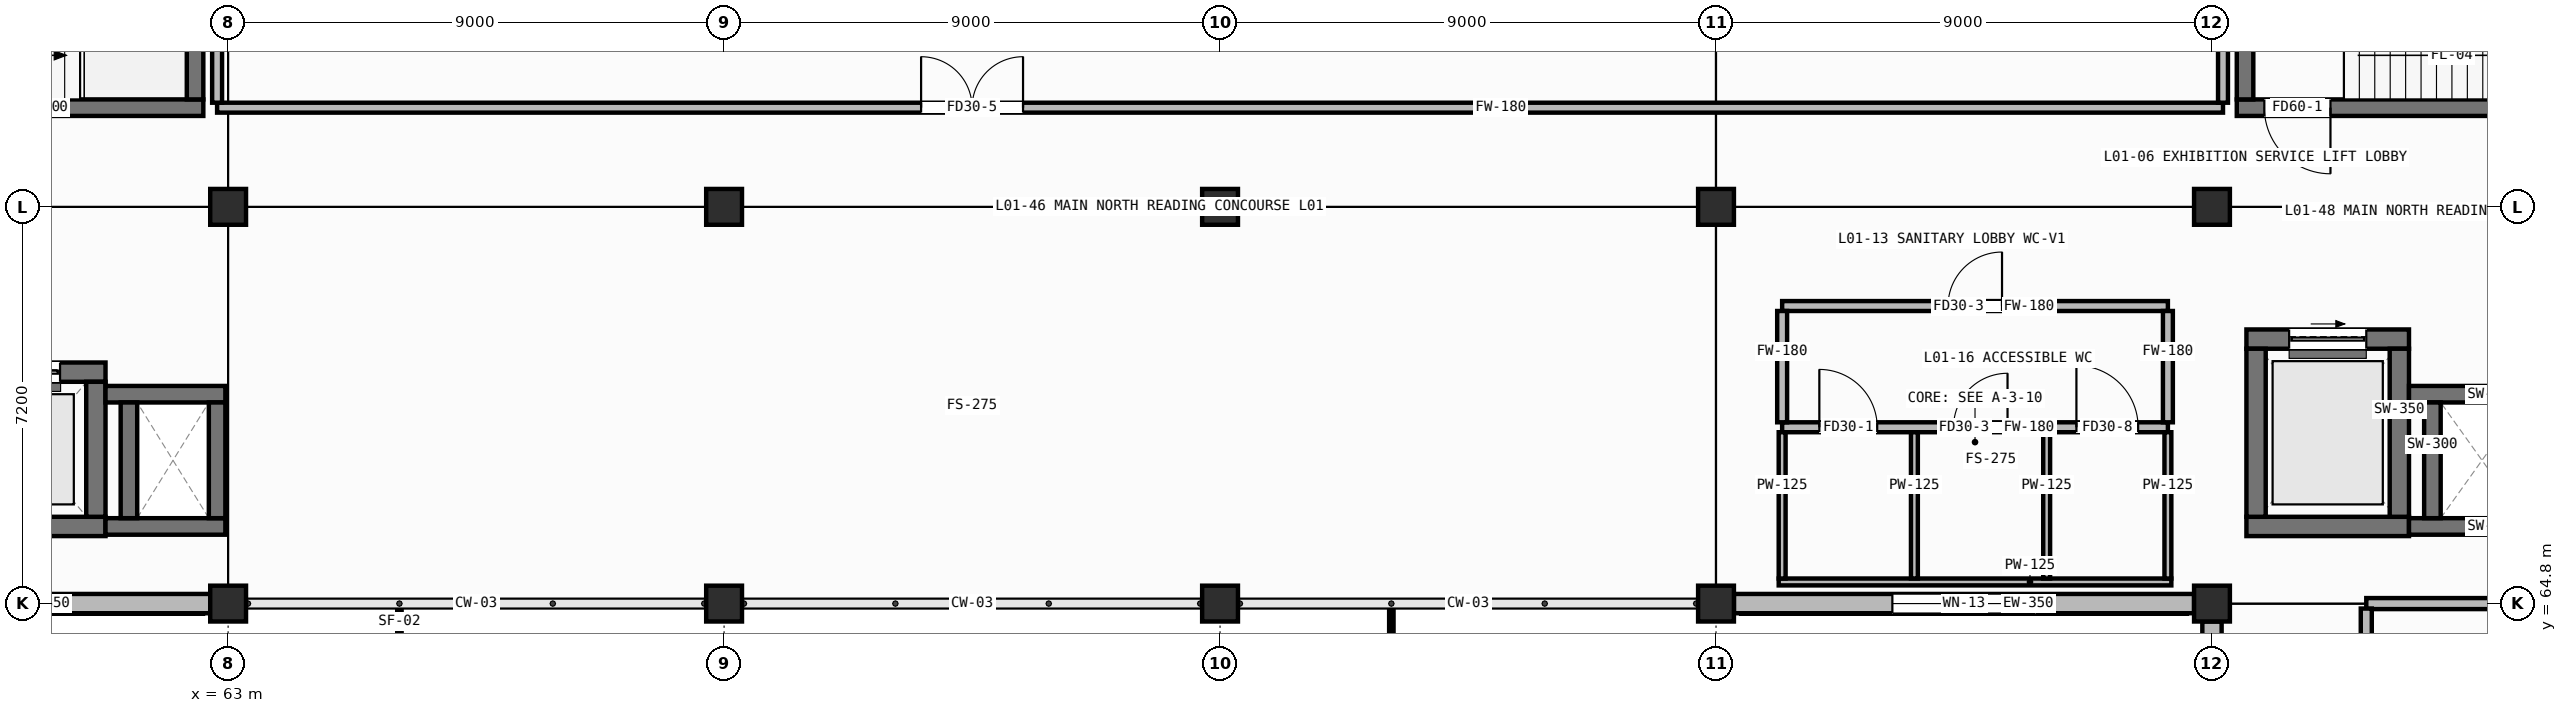
"""IFC4 building model, lengths in metres.
Left out: names, types, materials, properties, quantities, classifications, styles, units other than length and angle.
Written with IfcOpenShell. Run it as: python <this file> out.ifc"""

import sys

from ifc_helpers import new_model, si_unit, direction, frame, frame_2d, origin, origin_2d, place, context, subcontext, project, spatial, rectangle, hollow_rectangle, extrude, element, fill, save


model = new_model("IFC4")
c1 = context("Model", 3, precision=1e-05, world=origin(), true_north=direction((0.0, 1.0)))
c2 = subcontext(c1, "Body", "Model", "MODEL_VIEW")
j1 = project(units=[si_unit("LENGTHUNIT", "METRE"), si_unit("PLANEANGLEUNIT", "RADIAN")], contexts=[c1])
p1 = place(None, origin())
s1 = spatial("IfcSite", under=j1, at=p1, CompositionType="ELEMENT")
p2 = place(p1, origin())
s2 = spatial("IfcBuilding", under=s1, at=p2, CompositionType="ELEMENT")
p3 = place(p2, origin())
s3 = spatial("IfcBuildingStorey", under=s2, at=p3, CompositionType="ELEMENT", Elevation=0.0)
for number, where, z_axis, x_axis in (
    (1, (63.0, 64.8, 0.0), (0.0, 0.0, 1.0), (1.0, 0.0, 0.0)),
    (2, (63.0, 72.0, 0.0), (0.0, 0.0, 1.0), (1.0, 0.0, 0.0)),
    (3, (72.0, 64.8, 0.0), (0.0, 0.0, 1.0), (1.0, 0.0, 0.0)),
    (4, (72.0, 72.0, 0.0), (0.0, 0.0, 1.0), (1.0, 0.0, 0.0)),
    (5, (81.0, 64.8, 0.0), (0.0, 0.0, 1.0), (1.0, 0.0, 0.0)),
    (6, (81.0, 72.0, 0.0), (0.0, 0.0, 1.0), (1.0, 0.0, 0.0)),
    (7, (90.0, 64.8, 0.0), (0.0, 0.0, 1.0), (1.0, 0.0, 0.0)),
    (8, (90.0, 72.0, 0.0), (0.0, 0.0, 1.0), (1.0, 0.0, 0.0)),
    (9, (99.0, 64.8, 0.0), (0.0, 0.0, 1.0), (1.0, 0.0, 0.0)),
    (10, (99.0, 72.0, 0.0), (0.0, 0.0, 1.0), (1.0, 0.0, 0.0)),
):
    element("IfcColumn", number, at=place(p3, frame(where, z_axis=z_axis, x_axis=x_axis)), inside=s3, PredefinedType="COLUMN", context=c2, shape_type="SweptSolid", body=[
        extrude(hollow_rectangle(XDim=0.65, YDim=0.65, WallThickness=0.025, at=origin_2d()), origin(), (0.0, 0.0, 1.0), 4.8),
    ])
p4 = place(p3, frame((54.325, 64.8, 0.0), z_axis=(0.0, 0.0, 1.0), x_axis=(1.0, 0.0, 0.0)))
e11 = element("IfcWall", 11, at=p4, inside=s3, PredefinedType="STANDARD", context=c2, shape_type="SweptSolid", body=[
    extrude(rectangle(XDim=8.35, YDim=0.35, at=frame_2d((4.175, 0.0))), origin(), (0.0, 0.0, 1.0), 4.055),
])
p5 = place(p4, frame((2.875, 0.0, 0.85)))
e12 = element("IfcOpeningElement", 12, at=p5, cuts=e11, PredefinedType="OPENING", context=c2, shape_type="SweptSolid", body=[
    extrude(rectangle(XDim=2.6, YDim=1.6, at=frame_2d((1.3, 0.8))), frame((0.0, 0.187, 0.0), z_axis=(0.0, -1.0, 0.0), x_axis=(1.0, 0.0, 0.0)), (0.0, 0.0, 1.0), 0.374),
])
p6 = place(p3, frame((90.325, 64.8, 0.0), z_axis=(0.0, 0.0, 1.0), x_axis=(1.0, 0.0, 0.0)))
e13 = element("IfcWall", 13, at=p6, inside=s3, PredefinedType="STANDARD", context=c2, shape_type="SweptSolid", body=[
    extrude(rectangle(XDim=8.35, YDim=0.35, at=frame_2d((4.175, 0.0))), origin(), (0.0, 0.0, 1.0), 4.055),
])
p7 = place(p6, frame((2.875, 0.0, 0.85)))
e14 = element("IfcOpeningElement", 14, at=p7, cuts=e13, PredefinedType="OPENING", context=c2, shape_type="SweptSolid", body=[
    extrude(rectangle(XDim=2.6, YDim=1.6, at=frame_2d((1.3, 0.8))), frame((0.0, 0.187, 0.0), z_axis=(0.0, -1.0, 0.0), x_axis=(1.0, 0.0, 0.0)), (0.0, 0.0, 1.0), 0.374),
])
p8 = place(p3, frame((99.0, 57.925, 0.0), z_axis=(0.0, 0.0, 1.0), x_axis=(0.0, 1.0, 0.0)))
e15 = element("IfcWall", 15, at=p8, inside=s3, PredefinedType="STANDARD", context=c2, shape_type="SweptSolid", body=[
    extrude(rectangle(XDim=6.55, YDim=0.35, at=frame_2d((3.275, 0.0))), origin(), (0.0, 0.0, 1.0), 4.055),
])
p9 = place(p8, frame((1.975, 0.0, 0.85)))
e16 = element("IfcOpeningElement", 16, at=p9, cuts=e15, PredefinedType="OPENING", context=c2, shape_type="SweptSolid", body=[
    extrude(rectangle(XDim=2.6, YDim=1.6, at=frame_2d((1.3, 0.8))), frame((0.0, 0.187, 0.0), z_axis=(0.0, -1.0, 0.0), x_axis=(1.0, 0.0, 0.0)), (0.0, 0.0, 1.0), 0.374),
])
p10 = place(p3, frame((54.45, 73.8, 0.0), z_axis=(0.0, 0.0, 1.0), x_axis=(1.0, 0.0, 0.0)))
e17 = element("IfcWall", 17, at=p10, inside=s3, PredefinedType="SHEAR", context=c2, shape_type="SweptSolid", body=[
    extrude(rectangle(XDim=8.1, YDim=0.3, at=frame_2d((4.05, 0.0))), origin(), (0.0, 0.0, 1.0), 4.555),
])
p11 = place(p10, frame((0.5, 0.0, 0.0)))
e18 = element("IfcOpeningElement", 18, at=p11, cuts=e17, PredefinedType="OPENING", context=c2, shape_type="SweptSolid", body=[
    extrude(rectangle(XDim=1.2, YDim=2.1, at=frame_2d((0.6, 1.05))), frame((0.0, 0.162, 0.0), z_axis=(0.0, -1.0, 0.0), x_axis=(1.0, 0.0, 0.0)), (0.0, 0.0, 1.0), 0.324),
])
p12 = place(p3, frame((62.4, 73.95, 0.0), z_axis=(0.0, 0.0, 1.0), x_axis=(0.0, 1.0, 0.0)))
e19 = element("IfcWall", 19, at=p12, inside=s3, PredefinedType="SHEAR", context=c2, shape_type="SweptSolid", body=[
    extrude(rectangle(XDim=3.8, YDim=0.3, at=frame_2d((1.9, 0.0))), origin(), (0.0, 0.0, 1.0), 4.555),
])
p13 = place(p3, frame((99.45, 73.8, 0.0), z_axis=(0.0, 0.0, 1.0), x_axis=(1.0, 0.0, 0.0)))
e20 = element("IfcWall", 20, at=p13, inside=s3, PredefinedType="SHEAR", context=c2, shape_type="SweptSolid", body=[
    extrude(rectangle(XDim=8.1, YDim=0.3, at=frame_2d((4.05, 0.0))), origin(), (0.0, 0.0, 1.0), 4.555),
])
p14 = place(p13, frame((0.5, 0.0, 0.0)))
e21 = element("IfcOpeningElement", 21, at=p14, cuts=e20, PredefinedType="OPENING", context=c2, shape_type="SweptSolid", body=[
    extrude(rectangle(XDim=1.2, YDim=2.1, at=frame_2d((0.6, 1.05))), frame((0.0, 0.162, 0.0), z_axis=(0.0, -1.0, 0.0), x_axis=(1.0, 0.0, 0.0)), (0.0, 0.0, 1.0), 0.324),
])
p15 = place(p3, frame((99.6, 73.95, 0.0), z_axis=(0.0, 0.0, 1.0), x_axis=(0.0, 1.0, 0.0)))
e22 = element("IfcWall", 22, at=p15, inside=s3, PredefinedType="SHEAR", context=c2, shape_type="SweptSolid", body=[
    extrude(rectangle(XDim=3.8, YDim=0.3, at=frame_2d((1.9, 0.0))), origin(), (0.0, 0.0, 1.0), 4.555),
])
p16 = place(p3, frame((58.025, 66.2, 0.0), z_axis=(0.0, 0.0, 1.0), x_axis=(1.0, 0.0, 0.0)))
e23 = element("IfcWall", 23, at=p16, inside=s3, PredefinedType="SHEAR", context=c2, shape_type="SweptSolid", body=[
    extrude(rectangle(XDim=2.75, YDim=0.35, at=frame_2d((1.375, 0.0))), origin(), (0.0, 0.0, 1.0), 4.555),
])
p17 = place(p3, frame((58.025, 69.0, 0.0), z_axis=(0.0, 0.0, 1.0), x_axis=(1.0, 0.0, 0.0)))
e24 = element("IfcWall", 24, at=p17, inside=s3, PredefinedType="SHEAR", context=c2, shape_type="SweptSolid", body=[
    extrude(rectangle(XDim=2.75, YDim=0.35, at=frame_2d((1.375, 0.0))), origin(), (0.0, 0.0, 1.0), 4.555),
])
p18 = place(p17, frame((0.825, 0.0, 0.0)))
e25 = element("IfcOpeningElement", 25, at=p18, cuts=e24, PredefinedType="OPENING", context=c2, shape_type="SweptSolid", body=[
    extrude(rectangle(XDim=1.1, YDim=2.1, at=frame_2d((0.55, 1.05))), frame((0.0, 0.187, 0.0), z_axis=(0.0, -1.0, 0.0), x_axis=(1.0, 0.0, 0.0)), (0.0, 0.0, 1.0), 0.374),
])
p19 = place(p3, frame((60.6, 66.375, 0.0), z_axis=(0.0, 0.0, 1.0), x_axis=(0.0, 1.0, 0.0)))
e26 = element("IfcWall", 26, at=p19, inside=s3, PredefinedType="SHEAR", context=c2, shape_type="SweptSolid", body=[
    extrude(rectangle(XDim=2.45, YDim=0.35, at=frame_2d((1.225, 0.0))), origin(), (0.0, 0.0, 1.0), 4.555),
])
p20 = place(p3, frame((99.625, 66.2, 0.0), z_axis=(0.0, 0.0, 1.0), x_axis=(1.0, 0.0, 0.0)))
e27 = element("IfcWall", 27, at=p20, inside=s3, PredefinedType="SHEAR", context=c2, shape_type="SweptSolid", body=[
    extrude(rectangle(XDim=2.95, YDim=0.35, at=frame_2d((1.475, 0.0))), origin(), (0.0, 0.0, 1.0), 4.555),
])
p21 = place(p3, frame((99.625, 69.6, 0.0), z_axis=(0.0, 0.0, 1.0), x_axis=(1.0, 0.0, 0.0)))
e28 = element("IfcWall", 28, at=p21, inside=s3, PredefinedType="SHEAR", context=c2, shape_type="SweptSolid", body=[
    extrude(rectangle(XDim=2.95, YDim=0.35, at=frame_2d((1.475, 0.0))), origin(), (0.0, 0.0, 1.0), 4.555),
])
p22 = place(p21, frame((0.775, 0.0, 0.0)))
e29 = element("IfcOpeningElement", 29, at=p22, cuts=e28, PredefinedType="OPENING", context=c2, shape_type="SweptSolid", body=[
    extrude(rectangle(XDim=1.4, YDim=2.15, at=frame_2d((0.7, 1.075))), frame((0.0, 0.187, 0.0), z_axis=(0.0, -1.0, 0.0), x_axis=(1.0, 0.0, 0.0)), (0.0, 0.0, 1.0), 0.374),
])
for number, where, z_axis, x_axis in (
    (30, (99.8, 66.375, 0.0), (0.0, 0.0, 1.0), (0.0, 1.0, 0.0)),
    (31, (102.4, 66.375, 0.0), (0.0, 0.0, 1.0), (0.0, 1.0, 0.0)),
):
    element("IfcWall", number, at=place(p3, frame(where, z_axis=z_axis, x_axis=x_axis)), inside=s3, PredefinedType="SHEAR", context=c2, shape_type="SweptSolid", body=[
        extrude(rectangle(XDim=3.05, YDim=0.35, at=frame_2d((1.525, 0.0))), origin(), (0.0, 0.0, 1.0), 4.555),
    ])
for number, where, z_axis, x_axis in (
    (32, (60.775, 66.2, 0.0), (0.0, 0.0, 1.0), (1.0, 0.0, 0.0)),
    (33, (60.775, 68.6, 0.0), (0.0, 0.0, 1.0), (1.0, 0.0, 0.0)),
):
    element("IfcWall", number, at=place(p3, frame(where, z_axis=z_axis, x_axis=x_axis)), inside=s3, PredefinedType="SHEAR", context=c2, shape_type="SweptSolid", body=[
        extrude(rectangle(XDim=2.175, YDim=0.3, at=frame_2d((1.087, 0.0))), origin(), (0.0, 0.0, 1.0), 4.555),
    ])
for number, where, z_axis, x_axis in (
    (34, (61.2, 66.35, 0.0), (0.0, 0.0, 1.0), (0.0, 1.0, 0.0)),
    (35, (62.8, 66.35, 0.0), (0.0, 0.0, 1.0), (0.0, 1.0, 0.0)),
):
    element("IfcWall", number, at=place(p3, frame(where, z_axis=z_axis, x_axis=x_axis)), inside=s3, PredefinedType="SHEAR", context=c2, shape_type="SweptSolid", body=[
        extrude(rectangle(XDim=2.1, YDim=0.3, at=frame_2d((1.05, 0.0))), origin(), (0.0, 0.0, 1.0), 4.555),
    ])
for number, where, z_axis, x_axis in (
    (36, (102.575, 66.2, 0.0), (0.0, 0.0, 1.0), (1.0, 0.0, 0.0)),
    (37, (102.575, 68.6, 0.0), (0.0, 0.0, 1.0), (1.0, 0.0, 0.0)),
):
    element("IfcWall", number, at=place(p3, frame(where, z_axis=z_axis, x_axis=x_axis)), inside=s3, PredefinedType="SHEAR", context=c2, shape_type="SweptSolid", body=[
        extrude(rectangle(XDim=2.375, YDim=0.3, at=frame_2d((1.188, 0.0))), origin(), (0.0, 0.0, 1.0), 4.555),
    ])
p23 = place(p3, frame((103.0, 66.35, 0.0), z_axis=(0.0, 0.0, 1.0), x_axis=(0.0, 1.0, 0.0)))
e38 = element("IfcWall", 38, at=p23, inside=s3, PredefinedType="SHEAR", context=c2, shape_type="SweptSolid", body=[
    extrude(rectangle(XDim=2.1, YDim=0.3, at=frame_2d((1.05, 0.0))), origin(), (0.0, 0.0, 1.0), 4.555),
])
p24 = place(p3, frame((91.137, 65.192, 0.0), z_axis=(0.0, 0.0, 1.0), x_axis=(1.0, 0.0, 0.0)))
e39 = element("IfcWall", 39, at=p24, inside=s3, PredefinedType="PARTITIONING", context=c2, shape_type="SweptSolid", body=[
    extrude(rectangle(XDim=7.125, YDim=0.125, at=frame_2d((3.562, 0.0))), origin(), (0.0, 0.0, 1.0), 4.555),
])
p25 = place(p3, frame((91.2, 68.0, 0.0), z_axis=(0.0, 0.0, 1.0), x_axis=(1.0, 0.0, 0.0)))
e40 = element("IfcWall", 40, at=p25, inside=s3, PredefinedType="PARTITIONING", context=c2, shape_type="SweptSolid", body=[
    extrude(rectangle(XDim=7.0, YDim=0.18, at=frame_2d((3.5, 0.0))), origin(), (0.0, 0.0, 1.0), 4.555),
])
p26 = place(p25, frame((0.675, 0.0, 0.0)))
e41 = element("IfcOpeningElement", 41, at=p26, cuts=e40, PredefinedType="OPENING", context=c2, shape_type="SweptSolid", body=[
    extrude(rectangle(XDim=1.05, YDim=2.1, at=frame_2d((0.525, 1.05))), frame((0.0, 0.102, 0.0), z_axis=(0.0, -1.0, 0.0), x_axis=(1.0, 0.0, 0.0)), (0.0, 0.0, 1.0), 0.204),
])
p27 = place(p25, frame((3.11, 0.0, 0.0)))
e42 = element("IfcOpeningElement", 42, at=p27, cuts=e40, PredefinedType="OPENING", context=c2, shape_type="SweptSolid", body=[
    extrude(rectangle(XDim=0.98, YDim=2.02, at=frame_2d((0.49, 1.01))), frame((0.0, 0.102, 0.0), z_axis=(0.0, -1.0, 0.0), x_axis=(1.0, 0.0, 0.0)), (0.0, 0.0, 1.0), 0.204),
])
p28 = place(p25, frame((5.34, 0.0, 0.0)))
e43 = element("IfcOpeningElement", 43, at=p28, cuts=e40, PredefinedType="OPENING", context=c2, shape_type="SweptSolid", body=[
    extrude(rectangle(XDim=1.12, YDim=2.08, at=frame_2d((0.56, 1.04))), frame((0.0, 0.102, 0.0), z_axis=(0.0, -1.0, 0.0), x_axis=(1.0, 0.0, 0.0)), (0.0, 0.0, 1.0), 0.204),
])
p29 = place(p3, frame((91.2, 70.2, 0.0), z_axis=(0.0, 0.0, 1.0), x_axis=(1.0, 0.0, 0.0)))
e44 = element("IfcWall", 44, at=p29, inside=s3, PredefinedType="PARTITIONING", context=c2, shape_type="SweptSolid", body=[
    extrude(rectangle(XDim=7.0, YDim=0.18, at=frame_2d((3.5, 0.0))), origin(), (0.0, 0.0, 1.0), 4.555),
])
p30 = place(p29, frame((3.01, 0.0, 0.0)))
e45 = element("IfcOpeningElement", 45, at=p30, cuts=e44, PredefinedType="OPENING", context=c2, shape_type="SweptSolid", body=[
    extrude(rectangle(XDim=0.98, YDim=2.02, at=frame_2d((0.49, 1.01))), frame((0.0, 0.102, 0.0), z_axis=(0.0, -1.0, 0.0), x_axis=(1.0, 0.0, 0.0)), (0.0, 0.0, 1.0), 0.204),
])
for number, where, z_axis, x_axis in (
    (46, (91.2, 68.09, 0.0), (0.0, 0.0, 1.0), (0.0, 1.0, 0.0)),
    (47, (98.2, 68.09, 0.0), (0.0, 0.0, 1.0), (0.0, 1.0, 0.0)),
):
    element("IfcWall", number, at=place(p3, frame(where, z_axis=z_axis, x_axis=x_axis)), inside=s3, PredefinedType="PARTITIONING", context=c2, shape_type="SweptSolid", body=[
        extrude(rectangle(XDim=2.02, YDim=0.18, at=frame_2d((1.01, 0.0))), origin(), (0.0, 0.0, 1.0), 4.555),
    ])
for number, where, z_axis, x_axis in (
    (48, (91.2, 65.255, 0.0), (0.0, 0.0, 1.0), (0.0, 1.0, 0.0)),
    (49, (93.6, 65.255, 0.0), (0.0, 0.0, 1.0), (0.0, 1.0, 0.0)),
    (50, (96.0, 65.255, 0.0), (0.0, 0.0, 1.0), (0.0, 1.0, 0.0)),
    (51, (98.2, 65.255, 0.0), (0.0, 0.0, 1.0), (0.0, 1.0, 0.0)),
):
    element("IfcWall", number, at=place(p3, frame(where, z_axis=z_axis, x_axis=x_axis)), inside=s3, PredefinedType="PARTITIONING", context=c2, shape_type="SweptSolid", body=[
        extrude(rectangle(XDim=2.655, YDim=0.125, at=frame_2d((1.328, 0.0))), origin(), (0.0, 0.0, 1.0), 4.555),
    ])
p31 = place(p3, frame((101.8, 64.8, 0.0), z_axis=(0.0, 0.0, 1.0), x_axis=(1.0, 0.0, 0.0)))
e52 = element("IfcWall", 52, at=p31, inside=s3, PredefinedType="PARTITIONING", context=c2, shape_type="SweptSolid", body=[
    extrude(rectangle(XDim=5.78, YDim=0.2, at=frame_2d((2.89, 0.0))), origin(), (0.0, 0.0, 1.0), 3.835),
])
p32 = place(p3, frame((101.8, 36.09, 0.0), z_axis=(0.0, 0.0, 1.0), x_axis=(0.0, 1.0, 0.0)))
e53 = element("IfcWall", 53, at=p32, inside=s3, PredefinedType="PARTITIONING", context=c2, shape_type="SweptSolid", body=[
    extrude(rectangle(XDim=28.62, YDim=0.2, at=frame_2d((14.31, 0.0))), origin(), (0.0, 0.0, 1.0), 4.555),
])
p33 = place(p32, frame((15.11, 0.0, 0.0)))
e54 = element("IfcOpeningElement", 54, at=p33, cuts=e53, PredefinedType="OPENING", context=c2, shape_type="SweptSolid", body=[
    extrude(rectangle(XDim=1.6, YDim=2.12, at=frame_2d((0.8, 1.06))), frame((0.0, 0.112, 0.0), z_axis=(0.0, -1.0, 0.0), x_axis=(1.0, 0.0, 0.0)), (0.0, 0.0, 1.0), 0.224),
])
p34 = place(p3, frame((62.8, 73.8, 0.0), z_axis=(0.0, 0.0, 1.0), x_axis=(1.0, 0.0, 0.0)))
e55 = element("IfcWall", 55, at=p34, inside=s3, PredefinedType="PARTITIONING", context=c2, shape_type="SweptSolid", body=[
    extrude(rectangle(XDim=36.4, YDim=0.18, at=frame_2d((18.2, 0.0))), origin(), (0.0, 0.0, 1.0), 4.555),
])
p35 = place(p34, frame((12.775, 0.0, 0.0)))
e56 = element("IfcOpeningElement", 56, at=p35, cuts=e55, PredefinedType="OPENING", context=c2, shape_type="SweptSolid", body=[
    extrude(rectangle(XDim=1.85, YDim=2.12, at=frame_2d((0.925, 1.06))), frame((0.0, 0.102, 0.0), z_axis=(0.0, -1.0, 0.0), x_axis=(1.0, 0.0, 0.0)), (0.0, 0.0, 1.0), 0.204),
])
for number, where, z_axis, x_axis in (
    (57, (62.8, 73.89, 0.0), (0.0, 0.0, 1.0), (0.0, 1.0, 0.0)),
    (58, (99.2, 73.89, 0.0), (0.0, 0.0, 1.0), (0.0, 1.0, 0.0)),
):
    element("IfcWall", number, at=place(p3, frame(where, z_axis=z_axis, x_axis=x_axis)), inside=s3, PredefinedType="PARTITIONING", context=c2, shape_type="SweptSolid", body=[
        extrude(rectangle(XDim=11.42, YDim=0.18, at=frame_2d((5.71, 0.0))), origin(), (0.0, 0.0, 1.0), 3.835),
    ])
p36 = place(p7, origin())
e59 = element("IfcWindow", 59, at=p36, inside=s3, PartitioningType="DOUBLE_PANEL_VERTICAL", PredefinedType="WINDOW", context=c2, shape_type="SweptSolid", body=[
    extrude(rectangle(XDim=2.6, YDim=1.6, at=frame_2d((1.3, 0.8))), frame((0.0, 0.03, 0.0), z_axis=(0.0, -1.0, 0.0), x_axis=(1.0, 0.0, 0.0)), (0.0, 0.0, 1.0), 0.06),
])
fill(e14, e59)
p37 = place(p14, frame((1.2, 0.0, 0.0), z_axis=(0.0, 0.0, 1.0), x_axis=(-1.0, 0.0, 0.0)))
e60 = element("IfcDoor", 60, at=p37, inside=s3, OperationType="SINGLE_SWING_LEFT", PredefinedType="DOOR", context=c2, shape_type="SweptSolid", body=[
    extrude(rectangle(XDim=1.2, YDim=2.1, at=frame_2d((0.6, 1.05))), frame((0.0, 0.025, 0.0), z_axis=(0.0, -1.0, 0.0), x_axis=(1.0, 0.0, 0.0)), (0.0, 0.0, 1.0), 0.05),
])
fill(e21, e60)
p38 = place(p18, origin())
e61 = element("IfcDoor", 61, at=p38, inside=s3, OperationType="SLIDING_TO_RIGHT", PredefinedType="DOOR", context=c2, shape_type="SweptSolid", body=[
    extrude(rectangle(XDim=1.1, YDim=2.1, at=frame_2d((0.55, 1.05))), frame((0.0, 0.025, 0.0), z_axis=(0.0, -1.0, 0.0), x_axis=(1.0, 0.0, 0.0)), (0.0, 0.0, 1.0), 0.05),
])
fill(e25, e61)
p39 = place(p22, origin())
e62 = element("IfcDoor", 62, at=p39, inside=s3, OperationType="SLIDING_TO_RIGHT", PredefinedType="DOOR", context=c2, shape_type="SweptSolid", body=[
    extrude(rectangle(XDim=1.4, YDim=2.15, at=frame_2d((0.7, 1.075))), frame((0.0, 0.025, 0.0), z_axis=(0.0, -1.0, 0.0), x_axis=(1.0, 0.0, 0.0)), (0.0, 0.0, 1.0), 0.05),
])
fill(e29, e62)
p40 = place(p30, origin())
e63 = element("IfcDoor", 63, at=p40, inside=s3, OperationType="SINGLE_SWING_RIGHT", PredefinedType="DOOR", context=c2, shape_type="SweptSolid", body=[
    extrude(rectangle(XDim=0.98, YDim=2.02, at=frame_2d((0.49, 1.01))), frame((0.0, 0.025, 0.0), z_axis=(0.0, -1.0, 0.0), x_axis=(1.0, 0.0, 0.0)), (0.0, 0.0, 1.0), 0.05),
])
fill(e45, e63)
p41 = place(p26, origin())
e64 = element("IfcDoor", 64, at=p41, inside=s3, OperationType="SINGLE_SWING_LEFT", PredefinedType="DOOR", context=c2, shape_type="SweptSolid", body=[
    extrude(rectangle(XDim=1.05, YDim=2.1, at=frame_2d((0.525, 1.05))), frame((0.0, 0.025, 0.0), z_axis=(0.0, -1.0, 0.0), x_axis=(1.0, 0.0, 0.0)), (0.0, 0.0, 1.0), 0.05),
])
fill(e41, e64)
p42 = place(p27, origin())
e65 = element("IfcDoor", 65, at=p42, inside=s3, OperationType="SINGLE_SWING_RIGHT", PredefinedType="DOOR", context=c2, shape_type="SweptSolid", body=[
    extrude(rectangle(XDim=0.98, YDim=2.02, at=frame_2d((0.49, 1.01))), frame((0.0, 0.025, 0.0), z_axis=(0.0, -1.0, 0.0), x_axis=(1.0, 0.0, 0.0)), (0.0, 0.0, 1.0), 0.05),
])
fill(e42, e65)
p43 = place(p28, origin())
e66 = element("IfcDoor", 66, at=p43, inside=s3, OperationType="SINGLE_SWING_LEFT", PredefinedType="DOOR", context=c2, shape_type="SweptSolid", body=[
    extrude(rectangle(XDim=1.12, YDim=2.08, at=frame_2d((0.56, 1.04))), frame((0.0, 0.025, 0.0), z_axis=(0.0, -1.0, 0.0), x_axis=(1.0, 0.0, 0.0)), (0.0, 0.0, 1.0), 0.05),
])
fill(e43, e66)
p44 = place(p35, origin())
e67 = element("IfcDoor", 67, at=p44, inside=s3, OperationType="DOUBLE_DOOR_SINGLE_SWING", PredefinedType="DOOR", context=c2, shape_type="SweptSolid", body=[
    extrude(rectangle(XDim=1.85, YDim=2.12, at=frame_2d((0.925, 1.06))), frame((0.0, 0.025, 0.0), z_axis=(0.0, -1.0, 0.0), x_axis=(1.0, 0.0, 0.0)), (0.0, 0.0, 1.0), 0.05),
])
fill(e56, e67)
save(model, sys.argv[1])
